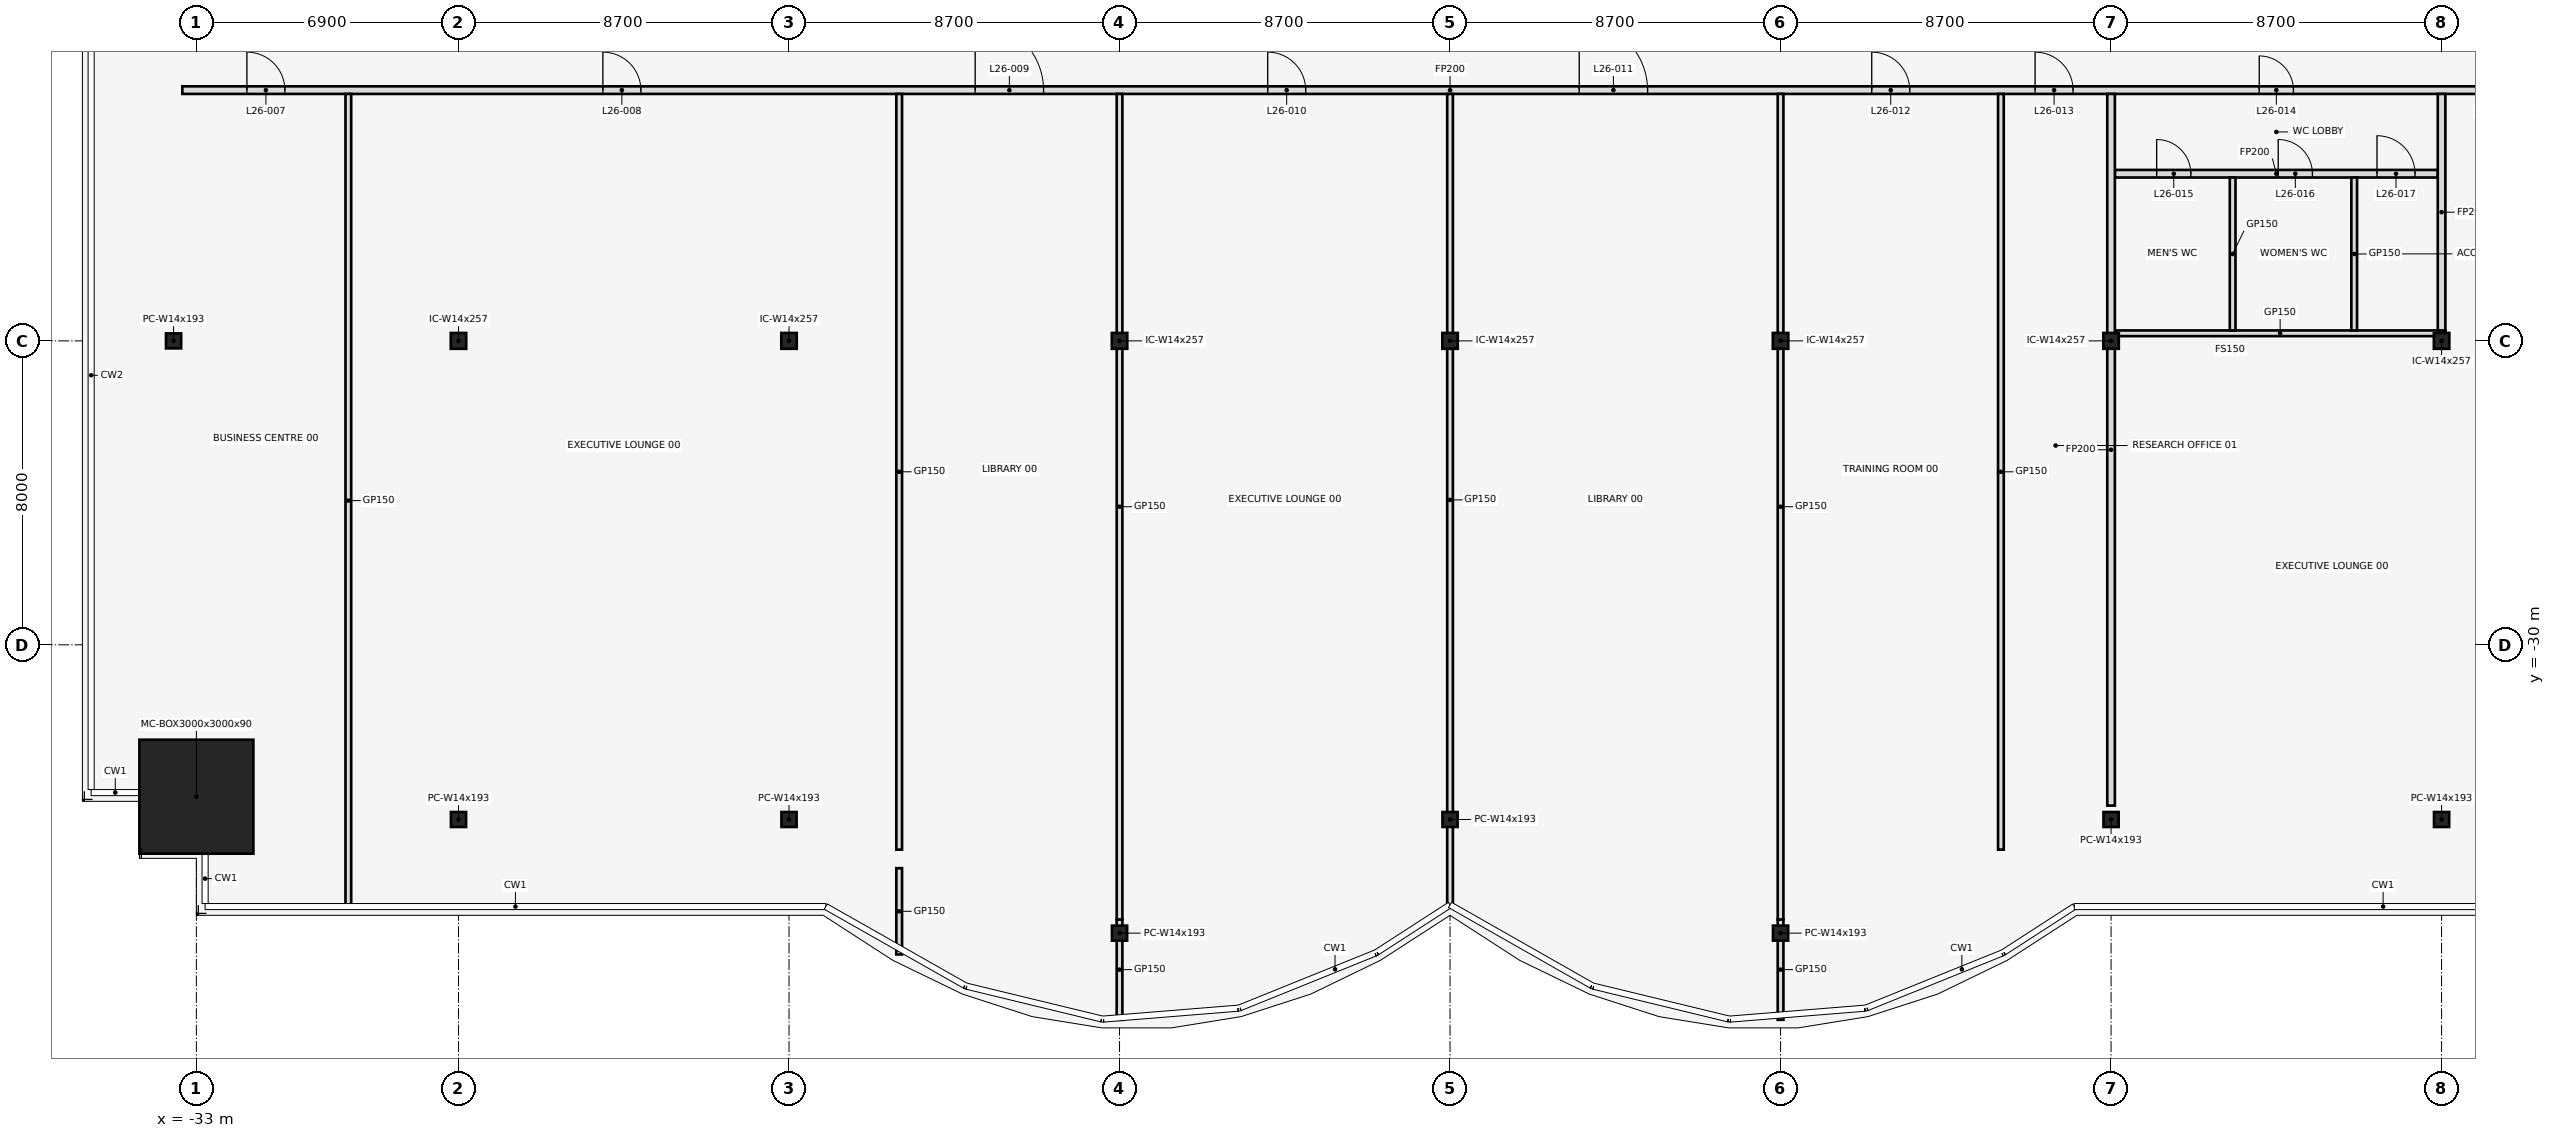
"""IFC4 building model, lengths in metres.
Left out: names, types, materials, properties, quantities, classifications, styles, units other than length and angle.
Written with IfcOpenShell. Run it as: python <this file> out.ifc"""

import sys

from ifc_helpers import new_model, si_unit, direction, frame, frame_2d, origin, origin_2d, place, context, subcontext, project, spatial, rectangle, hollow_rectangle, i_section, extrude, element, fill, save


model = new_model("IFC4")
c1 = context("Model", 3, precision=1e-05, world=origin(), true_north=direction((0.0, 1.0)))
c2 = subcontext(c1, "Body", "Model", "MODEL_VIEW")
j1 = project(units=[si_unit("LENGTHUNIT", "METRE"), si_unit("PLANEANGLEUNIT", "RADIAN")], contexts=[c1])
p1 = place(None, origin())
s1 = spatial("IfcSite", under=j1, at=p1, CompositionType="ELEMENT")
p2 = place(p1, origin())
s2 = spatial("IfcBuilding", under=s1, at=p2, CompositionType="ELEMENT")
p3 = place(p2, frame((0.0, 0.0, 122.7)))
s3 = spatial("IfcBuildingStorey", under=s2, at=p3, CompositionType="ELEMENT", Elevation=122.7)
p4 = place(p3, frame((-33.0, -33.998, 0.0), z_axis=(0.0, 0.0, 1.0), x_axis=(1.0, 0.0, 0.0)))
e1 = element("IfcColumn", 1, at=p4, inside=s3, PredefinedType="COLUMN", context=c2, shape_type="SweptSolid", body=[
    extrude(hollow_rectangle(XDim=3.0, YDim=3.0, WallThickness=0.09, at=origin_2d()), origin(), (0.0, 0.0, 1.0), 4.1),
])
for number, where, z_axis, x_axis in (
    (2, (-26.1, -34.598, 0.0), (0.0, 0.0, 1.0), (1.0, 0.0, 0.0)),
    (3, (-17.4, -34.598, 0.0), (0.0, 0.0, 1.0), (1.0, 0.0, 0.0)),
    (4, (-8.7, -37.589, 0.0), (0.0, 0.0, 1.0), (1.0, 0.0, 0.0)),
    (5, (0.0, -34.598, 0.0), (0.0, 0.0, 1.0), (1.0, 0.0, 0.0)),
    (6, (8.7, -37.589, 0.0), (0.0, 0.0, 1.0), (1.0, 0.0, 0.0)),
    (7, (17.4, -34.598, 0.0), (0.0, 0.0, 1.0), (1.0, 0.0, 0.0)),
    (8, (26.1, -34.598, 0.0), (0.0, 0.0, 1.0), (1.0, 0.0, 0.0)),
    (9, (-33.6, -22.0, 0.0), (0.0, 0.0, 1.0), (1.0, 0.0, 0.0)),
):
    element("IfcColumn", number, at=place(p3, frame(where, z_axis=z_axis, x_axis=x_axis)), inside=s3, PredefinedType="COLUMN", context=c2, shape_type="SweptSolid", body=[
        extrude(i_section(OverallWidth=0.399, OverallDepth=0.394, WebThickness=0.023, FlangeThickness=0.037, at=origin_2d()), origin(), (0.0, 0.0, 1.0), 4.1),
    ])
for number, where, z_axis, x_axis in (
    (10, (-26.1, -22.0, 0.0), (0.0, 0.0, 1.0), (1.0, 0.0, 0.0)),
    (11, (-17.4, -22.0, 0.0), (0.0, 0.0, 1.0), (1.0, 0.0, 0.0)),
    (12, (-8.7, -22.0, 0.0), (0.0, 0.0, 1.0), (1.0, 0.0, 0.0)),
    (13, (0.0, -22.0, 0.0), (0.0, 0.0, 1.0), (1.0, 0.0, 0.0)),
    (14, (8.7, -22.0, 0.0), (0.0, 0.0, 1.0), (1.0, 0.0, 0.0)),
    (15, (17.4, -22.0, 0.0), (0.0, 0.0, 1.0), (1.0, 0.0, 0.0)),
    (16, (26.1, -22.0, 0.0), (0.0, 0.0, 1.0), (1.0, 0.0, 0.0)),
):
    element("IfcColumn", number, at=place(p3, frame(where, z_axis=z_axis, x_axis=x_axis)), inside=s3, PredefinedType="COLUMN", context=c2, shape_type="SweptSolid", body=[
        extrude(i_section(OverallWidth=0.406, OverallDepth=0.417, WebThickness=0.03, FlangeThickness=0.048, at=origin_2d()), origin(), (0.0, 0.0, 1.0), 4.1),
    ])
p5 = place(p3, frame((17.5, -21.8, 0.0), z_axis=(0.0, 0.0, 1.0), x_axis=(1.0, 0.0, 0.0)))
e17 = element("IfcWall", 17, at=p5, inside=s3, PredefinedType="PARTITIONING", context=c2, shape_type="SweptSolid", body=[
    extrude(rectangle(XDim=8.7, YDim=0.15, at=frame_2d((4.35, 0.0))), origin(), (0.0, 0.0, 1.0), 3.018),
])
p6 = place(p3, frame((17.5, -17.6, 0.0), z_axis=(0.0, 0.0, 1.0), x_axis=(1.0, 0.0, 0.0)))
e18 = element("IfcWall", 18, at=p6, inside=s3, PredefinedType="PARTITIONING", context=c2, shape_type="SweptSolid", body=[
    extrude(rectangle(XDim=8.5, YDim=0.2, at=frame_2d((4.25, 0.0))), origin(), (0.0, 0.0, 1.0), 3.018),
])
p7 = place(p6, frame((1.1, 0.0, 0.0)))
e19 = element("IfcOpeningElement", 19, at=p7, cuts=e18, PredefinedType="OPENING", context=c2, shape_type="SweptSolid", body=[
    extrude(rectangle(XDim=0.9, YDim=2.1, at=frame_2d((0.45, 1.05))), frame((0.0, 0.112, 0.0), z_axis=(0.0, -1.0, 0.0), x_axis=(1.0, 0.0, 0.0)), (0.0, 0.0, 1.0), 0.224),
])
p8 = place(p6, frame((4.3, 0.0, 0.0)))
e20 = element("IfcOpeningElement", 20, at=p8, cuts=e18, PredefinedType="OPENING", context=c2, shape_type="SweptSolid", body=[
    extrude(rectangle(XDim=0.9, YDim=2.1, at=frame_2d((0.45, 1.05))), frame((0.0, 0.112, 0.0), z_axis=(0.0, -1.0, 0.0), x_axis=(1.0, 0.0, 0.0)), (0.0, 0.0, 1.0), 0.224),
])
p9 = place(p6, frame((6.9, 0.0, 0.0)))
e21 = element("IfcOpeningElement", 21, at=p9, cuts=e18, PredefinedType="OPENING", context=c2, shape_type="SweptSolid", body=[
    extrude(rectangle(XDim=1.0, YDim=2.1, at=frame_2d((0.5, 1.05))), frame((0.0, 0.112, 0.0), z_axis=(0.0, -1.0, 0.0), x_axis=(1.0, 0.0, 0.0)), (0.0, 0.0, 1.0), 0.224),
])
p10 = place(p3, frame((-33.37, -15.4, 0.0), z_axis=(0.0, 0.0, 1.0), x_axis=(1.0, 0.0, 0.0)))
e22 = element("IfcWall", 22, at=p10, inside=s3, PredefinedType="PARTITIONING", context=c2, shape_type="SweptSolid", body=[
    extrude(rectangle(XDim=66.74, YDim=0.2, at=frame_2d((33.37, 0.0))), origin(), (0.0, 0.0, 1.0), 3.018),
])
p11 = place(p10, frame((1.7, 0.0, 0.0)))
e23 = element("IfcOpeningElement", 23, at=p11, cuts=e22, PredefinedType="OPENING", context=c2, shape_type="SweptSolid", body=[
    extrude(rectangle(XDim=1.0, YDim=2.1, at=frame_2d((0.5, 1.05))), frame((0.0, 0.112, 0.0), z_axis=(0.0, -1.0, 0.0), x_axis=(1.0, 0.0, 0.0)), (0.0, 0.0, 1.0), 0.224),
])
p12 = place(p10, frame((11.07, 0.0, 0.0)))
e24 = element("IfcOpeningElement", 24, at=p12, cuts=e22, PredefinedType="OPENING", context=c2, shape_type="SweptSolid", body=[
    extrude(rectangle(XDim=1.0, YDim=2.1, at=frame_2d((0.5, 1.05))), frame((0.0, 0.112, 0.0), z_axis=(0.0, -1.0, 0.0), x_axis=(1.0, 0.0, 0.0)), (0.0, 0.0, 1.0), 0.224),
])
p13 = place(p10, frame((20.87, 0.0, 0.0)))
e25 = element("IfcOpeningElement", 25, at=p13, cuts=e22, PredefinedType="OPENING", context=c2, shape_type="SweptSolid", body=[
    extrude(rectangle(XDim=1.8, YDim=2.1, at=frame_2d((0.9, 1.05))), frame((0.0, 0.112, 0.0), z_axis=(0.0, -1.0, 0.0), x_axis=(1.0, 0.0, 0.0)), (0.0, 0.0, 1.0), 0.224),
])
p14 = place(p10, frame((28.57, 0.0, 0.0)))
e26 = element("IfcOpeningElement", 26, at=p14, cuts=e22, PredefinedType="OPENING", context=c2, shape_type="SweptSolid", body=[
    extrude(rectangle(XDim=1.0, YDim=2.1, at=frame_2d((0.5, 1.05))), frame((0.0, 0.112, 0.0), z_axis=(0.0, -1.0, 0.0), x_axis=(1.0, 0.0, 0.0)), (0.0, 0.0, 1.0), 0.224),
])
p15 = place(p10, frame((36.77, 0.0, 0.0)))
e27 = element("IfcOpeningElement", 27, at=p15, cuts=e22, PredefinedType="OPENING", context=c2, shape_type="SweptSolid", body=[
    extrude(rectangle(XDim=1.8, YDim=2.1, at=frame_2d((0.9, 1.05))), frame((0.0, 0.112, 0.0), z_axis=(0.0, -1.0, 0.0), x_axis=(1.0, 0.0, 0.0)), (0.0, 0.0, 1.0), 0.224),
])
p16 = place(p10, frame((44.47, 0.0, 0.0)))
e28 = element("IfcOpeningElement", 28, at=p16, cuts=e22, PredefinedType="OPENING", context=c2, shape_type="SweptSolid", body=[
    extrude(rectangle(XDim=1.0, YDim=2.1, at=frame_2d((0.5, 1.05))), frame((0.0, 0.112, 0.0), z_axis=(0.0, -1.0, 0.0), x_axis=(1.0, 0.0, 0.0)), (0.0, 0.0, 1.0), 0.224),
])
p17 = place(p10, frame((48.77, 0.0, 0.0)))
e29 = element("IfcOpeningElement", 29, at=p17, cuts=e22, PredefinedType="OPENING", context=c2, shape_type="SweptSolid", body=[
    extrude(rectangle(XDim=1.0, YDim=2.1, at=frame_2d((0.5, 1.05))), frame((0.0, 0.112, 0.0), z_axis=(0.0, -1.0, 0.0), x_axis=(1.0, 0.0, 0.0)), (0.0, 0.0, 1.0), 0.224),
])
p18 = place(p10, frame((54.67, 0.0, 0.0)))
e30 = element("IfcOpeningElement", 30, at=p18, cuts=e22, PredefinedType="OPENING", context=c2, shape_type="SweptSolid", body=[
    extrude(rectangle(XDim=0.9, YDim=2.1, at=frame_2d((0.45, 1.05))), frame((0.0, 0.112, 0.0), z_axis=(0.0, -1.0, 0.0), x_axis=(1.0, 0.0, 0.0)), (0.0, 0.0, 1.0), 0.224),
])
p19 = place(p10, frame((60.37, 0.0, 0.0)))
e31 = element("IfcOpeningElement", 31, at=p19, cuts=e22, PredefinedType="OPENING", context=c2, shape_type="SweptSolid", body=[
    extrude(rectangle(XDim=1.0, YDim=2.1, at=frame_2d((0.5, 1.05))), frame((0.0, 0.112, 0.0), z_axis=(0.0, -1.0, 0.0), x_axis=(1.0, 0.0, 0.0)), (0.0, 0.0, 1.0), 0.224),
])
p20 = place(p10, frame((63.97, 0.0, 0.0)))
e32 = element("IfcOpeningElement", 32, at=p20, cuts=e22, PredefinedType="OPENING", context=c2, shape_type="SweptSolid", body=[
    extrude(rectangle(XDim=1.0, YDim=2.1, at=frame_2d((0.5, 1.05))), frame((0.0, 0.112, 0.0), z_axis=(0.0, -1.0, 0.0), x_axis=(1.0, 0.0, 0.0)), (0.0, 0.0, 1.0), 0.224),
])
p21 = place(p3, frame((-29.0, -36.91, 0.0), z_axis=(0.0, 0.0, 1.0), x_axis=(0.0, 1.0, 0.0)))
e33 = element("IfcWall", 33, at=p21, inside=s3, PredefinedType="PARTITIONING", context=c2, shape_type="SweptSolid", body=[
    extrude(rectangle(XDim=21.41, YDim=0.15, at=frame_2d((10.705, 0.0))), origin(), (0.0, 0.0, 1.0), 3.018),
])
p22 = place(p3, frame((-14.5, -38.15, 0.0), z_axis=(0.0, 0.0, 1.0), x_axis=(0.0, 1.0, 0.0)))
e34 = element("IfcWall", 34, at=p22, inside=s3, PredefinedType="PARTITIONING", context=c2, shape_type="SweptSolid", body=[
    extrude(rectangle(XDim=2.271, YDim=0.15, at=frame_2d((1.135, 0.0))), origin(), (0.0, 0.0, 1.0), 3.018),
])
p23 = place(p3, frame((-14.5, -35.392, 0.0), z_axis=(0.0, 0.0, 1.0), x_axis=(0.0, 1.0, 0.0)))
e35 = element("IfcWall", 35, at=p23, inside=s3, PredefinedType="PARTITIONING", context=c2, shape_type="SweptSolid", body=[
    extrude(rectangle(XDim=19.892, YDim=0.15, at=frame_2d((9.946, 0.0))), origin(), (0.0, 0.0, 1.0), 3.018),
])
p24 = place(p3, frame((-8.7, -39.87, 0.0), z_axis=(0.0, 0.0, 1.0), x_axis=(0.0, 1.0, 0.0)))
e36 = element("IfcWall", 36, at=p24, inside=s3, PredefinedType="PARTITIONING", context=c2, shape_type="SweptSolid", body=[
    extrude(rectangle(XDim=2.64, YDim=0.15, at=frame_2d((1.32, 0.0))), origin(), (0.0, 0.0, 1.0), 3.018),
])
p25 = place(p3, frame((-8.7, -37.23, 0.0), z_axis=(0.0, 0.0, 1.0), x_axis=(0.0, 1.0, 0.0)))
e37 = element("IfcWall", 37, at=p25, inside=s3, PredefinedType="PARTITIONING", context=c2, shape_type="SweptSolid", body=[
    extrude(rectangle(XDim=21.73, YDim=0.15, at=frame_2d((10.865, 0.0))), origin(), (0.0, 0.0, 1.0), 3.018),
])
p26 = place(p3, frame((0.0, -36.87, 0.0), z_axis=(0.0, 0.0, 1.0), x_axis=(0.0, 1.0, 0.0)))
e38 = element("IfcWall", 38, at=p26, inside=s3, PredefinedType="PARTITIONING", context=c2, shape_type="SweptSolid", body=[
    extrude(rectangle(XDim=21.37, YDim=0.15, at=frame_2d((10.685, 0.0))), origin(), (0.0, 0.0, 1.0), 3.018),
])
p27 = place(p3, frame((8.7, -39.87, 0.0), z_axis=(0.0, 0.0, 1.0), x_axis=(0.0, 1.0, 0.0)))
e39 = element("IfcWall", 39, at=p27, inside=s3, PredefinedType="PARTITIONING", context=c2, shape_type="SweptSolid", body=[
    extrude(rectangle(XDim=2.64, YDim=0.15, at=frame_2d((1.32, 0.0))), origin(), (0.0, 0.0, 1.0), 3.018),
])
p28 = place(p3, frame((8.7, -37.23, 0.0), z_axis=(0.0, 0.0, 1.0), x_axis=(0.0, 1.0, 0.0)))
e40 = element("IfcWall", 40, at=p28, inside=s3, PredefinedType="PARTITIONING", context=c2, shape_type="SweptSolid", body=[
    extrude(rectangle(XDim=21.73, YDim=0.15, at=frame_2d((10.865, 0.0))), origin(), (0.0, 0.0, 1.0), 3.018),
])
p29 = place(p3, frame((14.5, -35.392, 0.0), z_axis=(0.0, 0.0, 1.0), x_axis=(0.0, 1.0, 0.0)))
e41 = element("IfcWall", 41, at=p29, inside=s3, PredefinedType="PARTITIONING", context=c2, shape_type="SweptSolid", body=[
    extrude(rectangle(XDim=19.892, YDim=0.15, at=frame_2d((9.946, 0.0))), origin(), (0.0, 0.0, 1.0), 3.018),
])
p30 = place(p3, frame((17.4, -34.232, 0.0), z_axis=(0.0, 0.0, 1.0), x_axis=(0.0, 1.0, 0.0)))
e42 = element("IfcWall", 42, at=p30, inside=s3, PredefinedType="PARTITIONING", context=c2, shape_type="SweptSolid", body=[
    extrude(rectangle(XDim=18.732, YDim=0.2, at=frame_2d((9.366, 0.0))), origin(), (0.0, 0.0, 1.0), 3.018),
])
for number, where, z_axis, x_axis in (
    (43, (20.6, -21.725, 0.0), (0.0, 0.0, 1.0), (0.0, 1.0, 0.0)),
    (44, (23.8, -21.725, 0.0), (0.0, 0.0, 1.0), (0.0, 1.0, 0.0)),
):
    element("IfcWall", number, at=place(p3, frame(where, z_axis=z_axis, x_axis=x_axis)), inside=s3, PredefinedType="PARTITIONING", context=c2, shape_type="SweptSolid", body=[
        extrude(rectangle(XDim=4.025, YDim=0.15, at=frame_2d((2.013, 0.0))), origin(), (0.0, 0.0, 1.0), 3.018),
    ])
p31 = place(p3, frame((26.1, -21.725, 0.0), z_axis=(0.0, 0.0, 1.0), x_axis=(0.0, 1.0, 0.0)))
e45 = element("IfcWall", 45, at=p31, inside=s3, PredefinedType="PARTITIONING", context=c2, shape_type="SweptSolid", body=[
    extrude(rectangle(XDim=6.225, YDim=0.2, at=frame_2d((3.113, 0.0))), origin(), (0.0, 0.0, 1.0), 3.018),
])
p32 = place(p11, frame((1.0, 0.0, 0.0), z_axis=(0.0, 0.0, 1.0), x_axis=(-1.0, 0.0, 0.0)))
e46 = element("IfcDoor", 46, at=p32, inside=s3, OperationType="SINGLE_SWING_LEFT", PredefinedType="DOOR", context=c2, shape_type="SweptSolid", body=[
    extrude(rectangle(XDim=1.0, YDim=2.1, at=frame_2d((0.5, 1.05))), frame((0.0, 0.025, 0.0), z_axis=(0.0, -1.0, 0.0), x_axis=(1.0, 0.0, 0.0)), (0.0, 0.0, 1.0), 0.05),
])
fill(e23, e46)
p33 = place(p12, frame((1.0, 0.0, 0.0), z_axis=(0.0, 0.0, 1.0), x_axis=(-1.0, 0.0, 0.0)))
e47 = element("IfcDoor", 47, at=p33, inside=s3, OperationType="SINGLE_SWING_RIGHT", PredefinedType="DOOR", context=c2, shape_type="SweptSolid", body=[
    extrude(rectangle(XDim=1.0, YDim=2.1, at=frame_2d((0.5, 1.05))), frame((0.0, 0.025, 0.0), z_axis=(0.0, -1.0, 0.0), x_axis=(1.0, 0.0, 0.0)), (0.0, 0.0, 1.0), 0.05),
])
fill(e24, e47)
p34 = place(p13, origin())
e48 = element("IfcDoor", 48, at=p34, inside=s3, OperationType="SINGLE_SWING_LEFT", PredefinedType="DOOR", context=c2, shape_type="SweptSolid", body=[
    extrude(rectangle(XDim=1.8, YDim=2.1, at=frame_2d((0.9, 1.05))), frame((0.0, 0.025, 0.0), z_axis=(0.0, -1.0, 0.0), x_axis=(1.0, 0.0, 0.0)), (0.0, 0.0, 1.0), 0.05),
])
fill(e25, e48)
p35 = place(p14, frame((1.0, 0.0, 0.0), z_axis=(0.0, 0.0, 1.0), x_axis=(-1.0, 0.0, 0.0)))
e49 = element("IfcDoor", 49, at=p35, inside=s3, OperationType="SINGLE_SWING_LEFT", PredefinedType="DOOR", context=c2, shape_type="SweptSolid", body=[
    extrude(rectangle(XDim=1.0, YDim=2.1, at=frame_2d((0.5, 1.05))), frame((0.0, 0.025, 0.0), z_axis=(0.0, -1.0, 0.0), x_axis=(1.0, 0.0, 0.0)), (0.0, 0.0, 1.0), 0.05),
])
fill(e26, e49)
p36 = place(p15, origin())
e50 = element("IfcDoor", 50, at=p36, inside=s3, OperationType="SINGLE_SWING_LEFT", PredefinedType="DOOR", context=c2, shape_type="SweptSolid", body=[
    extrude(rectangle(XDim=1.8, YDim=2.1, at=frame_2d((0.9, 1.05))), frame((0.0, 0.025, 0.0), z_axis=(0.0, -1.0, 0.0), x_axis=(1.0, 0.0, 0.0)), (0.0, 0.0, 1.0), 0.05),
])
fill(e27, e50)
p37 = place(p16, frame((1.0, 0.0, 0.0), z_axis=(0.0, 0.0, 1.0), x_axis=(-1.0, 0.0, 0.0)))
e51 = element("IfcDoor", 51, at=p37, inside=s3, OperationType="SINGLE_SWING_RIGHT", PredefinedType="DOOR", context=c2, shape_type="SweptSolid", body=[
    extrude(rectangle(XDim=1.0, YDim=2.1, at=frame_2d((0.5, 1.05))), frame((0.0, 0.025, 0.0), z_axis=(0.0, -1.0, 0.0), x_axis=(1.0, 0.0, 0.0)), (0.0, 0.0, 1.0), 0.05),
])
fill(e28, e51)
p38 = place(p17, frame((1.0, 0.0, 0.0), z_axis=(0.0, 0.0, 1.0), x_axis=(-1.0, 0.0, 0.0)))
e52 = element("IfcDoor", 52, at=p38, inside=s3, OperationType="SINGLE_SWING_LEFT", PredefinedType="DOOR", context=c2, shape_type="SweptSolid", body=[
    extrude(rectangle(XDim=1.0, YDim=2.1, at=frame_2d((0.5, 1.05))), frame((0.0, 0.025, 0.0), z_axis=(0.0, -1.0, 0.0), x_axis=(1.0, 0.0, 0.0)), (0.0, 0.0, 1.0), 0.05),
])
fill(e29, e52)
p39 = place(p18, frame((0.9, 0.0, 0.0), z_axis=(0.0, 0.0, 1.0), x_axis=(-1.0, 0.0, 0.0)))
e53 = element("IfcDoor", 53, at=p39, inside=s3, OperationType="SINGLE_SWING_RIGHT", PredefinedType="DOOR", context=c2, shape_type="SweptSolid", body=[
    extrude(rectangle(XDim=0.9, YDim=2.1, at=frame_2d((0.45, 1.05))), frame((0.0, 0.025, 0.0), z_axis=(0.0, -1.0, 0.0), x_axis=(1.0, 0.0, 0.0)), (0.0, 0.0, 1.0), 0.05),
])
fill(e30, e53)
p40 = place(p7, frame((0.9, 0.0, 0.0), z_axis=(0.0, 0.0, 1.0), x_axis=(-1.0, 0.0, 0.0)))
e54 = element("IfcDoor", 54, at=p40, inside=s3, OperationType="SINGLE_SWING_RIGHT", PredefinedType="DOOR", context=c2, shape_type="SweptSolid", body=[
    extrude(rectangle(XDim=0.9, YDim=2.1, at=frame_2d((0.45, 1.05))), frame((0.0, 0.025, 0.0), z_axis=(0.0, -1.0, 0.0), x_axis=(1.0, 0.0, 0.0)), (0.0, 0.0, 1.0), 0.05),
])
fill(e19, e54)
p41 = place(p8, frame((0.9, 0.0, 0.0), z_axis=(0.0, 0.0, 1.0), x_axis=(-1.0, 0.0, 0.0)))
e55 = element("IfcDoor", 55, at=p41, inside=s3, OperationType="SINGLE_SWING_LEFT", PredefinedType="DOOR", context=c2, shape_type="SweptSolid", body=[
    extrude(rectangle(XDim=0.9, YDim=2.1, at=frame_2d((0.45, 1.05))), frame((0.0, 0.025, 0.0), z_axis=(0.0, -1.0, 0.0), x_axis=(1.0, 0.0, 0.0)), (0.0, 0.0, 1.0), 0.05),
])
fill(e20, e55)
p42 = place(p9, frame((1.0, 0.0, 0.0), z_axis=(0.0, 0.0, 1.0), x_axis=(-1.0, 0.0, 0.0)))
e56 = element("IfcDoor", 56, at=p42, inside=s3, OperationType="SINGLE_SWING_RIGHT", PredefinedType="DOOR", context=c2, shape_type="SweptSolid", body=[
    extrude(rectangle(XDim=1.0, YDim=2.1, at=frame_2d((0.5, 1.05))), frame((0.0, 0.025, 0.0), z_axis=(0.0, -1.0, 0.0), x_axis=(1.0, 0.0, 0.0)), (0.0, 0.0, 1.0), 0.05),
])
fill(e21, e56)
save(model, sys.argv[1])
